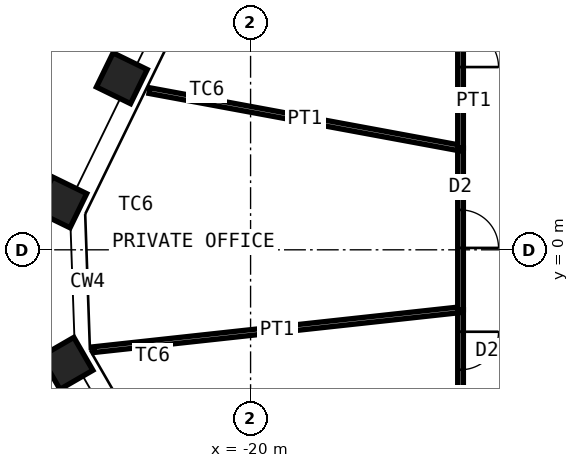
"""IFC4 building model, lengths in metres.
Left out: names, types, materials, properties, quantities, classifications, styles, units other than length and angle.
Written with IfcOpenShell. Run it as: python <this file> out.ifc"""

import sys

from ifc_helpers import new_model, si_unit, direction, frame, frame_2d, origin, origin_2d, place, context, subcontext, project, spatial, rectangle, hollow_rectangle, extrude, element, fill, save


model = new_model("IFC4")
c1 = context("Model", 3, precision=1e-05, world=origin(), true_north=direction((0.0, 1.0)))
c2 = subcontext(c1, "Body", "Model", "MODEL_VIEW")
j1 = project(units=[si_unit("LENGTHUNIT", "METRE"), si_unit("PLANEANGLEUNIT", "RADIAN")], contexts=[c1])
p1 = place(None, origin())
s1 = spatial("IfcSite", under=j1, at=p1, CompositionType="ELEMENT")
p2 = place(p1, origin())
s2 = spatial("IfcBuilding", under=s1, at=p2, CompositionType="ELEMENT")
p3 = place(p2, frame((0.0, 0.0, 239.2)))
s3 = spatial("IfcBuildingStorey", under=s2, at=p3, CompositionType="ELEMENT", Elevation=239.2)
for number, where, z_axis, x_axis in (
    (1, (-24.833, -2.988, 0.0), (0.0, 0.0, 1.0), (0.5, -0.866, 0.0)),
    (2, (-24.981, 1.248, 0.0), (0.0, 0.0, 1.0), (-0.438, -0.899, 0.0)),
    (3, (-23.388, 4.514, 0.0), (0.0, 0.0, 1.0), (-0.438, -0.899, 0.0)),
):
    element("IfcColumn", number, at=place(p3, frame(where, z_axis=z_axis, x_axis=x_axis)), inside=s3, PredefinedType="COLUMN", context=c2, shape_type="SweptSolid", body=[
        extrude(hollow_rectangle(XDim=1.0, YDim=1.0, WallThickness=0.06, at=origin_2d()), origin(), (0.0, 0.0, 1.0), 4.2),
    ])
p4 = place(p3, frame((-14.475, -3.736, 0.0), z_axis=(0.0, 0.0, 1.0), x_axis=(0.0, 1.0, 0.0)))
e4 = element("IfcWall", 4, at=p4, inside=s3, PredefinedType="PARTITIONING", context=c2, shape_type="SweptSolid", body=[
    extrude(rectangle(XDim=2.16, YDim=0.15, at=frame_2d((1.08, 0.0))), origin(), (0.0, 0.0, 1.0), 4.03),
])
p5 = place(p4, frame((0.58, 0.0, 0.0)))
e5 = element("IfcOpeningElement", 5, at=p5, cuts=e4, PredefinedType="OPENING", context=c2, shape_type="SweptSolid", body=[
    extrude(rectangle(XDim=1.0, YDim=2.4, at=frame_2d((0.5, 1.2))), frame((0.0, 0.085, 0.0), z_axis=(0.0, -1.0, 0.0), x_axis=(1.0, 0.0, 0.0)), (0.0, 0.0, 1.0), 0.17),
])
p6 = place(p3, frame((-24.128, -2.627, 0.0), z_axis=(0.0, 0.0, 1.0), x_axis=(0.994126892449, 0.108220708326, 0.0)))
e6 = element("IfcWall", 6, at=p6, inside=s3, PredefinedType="PARTITIONING", context=c2, shape_type="SweptSolid", body=[
    extrude(rectangle(XDim=9.71, YDim=0.15, at=frame_2d((4.855, 0.0))), origin(), (0.0, 0.0, 1.0), 2.93),
])
p7 = place(p3, frame((-14.475, -1.576, 0.0), z_axis=(0.0, 0.0, 1.0), x_axis=(0.0, 1.0, 0.0)))
e7 = element("IfcWall", 7, at=p7, inside=s3, PredefinedType="PARTITIONING", context=c2, shape_type="SweptSolid", body=[
    extrude(rectangle(XDim=4.252, YDim=0.15, at=frame_2d((2.126, 0.0))), origin(), (0.0, 0.0, 1.0), 4.03),
])
p8 = place(p7, frame((1.626, 0.0, 0.0)))
e8 = element("IfcOpeningElement", 8, at=p8, cuts=e7, PredefinedType="OPENING", context=c2, shape_type="SweptSolid", body=[
    extrude(rectangle(XDim=1.0, YDim=2.4, at=frame_2d((0.5, 1.2))), frame((0.0, 0.085, 0.0), z_axis=(0.0, -1.0, 0.0), x_axis=(1.0, 0.0, 0.0)), (0.0, 0.0, 1.0), 0.17),
])
p9 = place(p3, frame((-22.661, 4.189, 0.0), z_axis=(0.0, 0.0, 1.0), x_axis=(0.983345347199, -0.181746879316, 0.0)))
e9 = element("IfcWall", 9, at=p9, inside=s3, PredefinedType="PARTITIONING", context=c2, shape_type="SweptSolid", body=[
    extrude(rectangle(XDim=8.324, YDim=0.15, at=frame_2d((4.162, 0.0))), origin(), (0.0, 0.0, 1.0), 3.43),
])
p10 = place(p3, frame((-14.475, 2.676, 0.0), z_axis=(0.0, 0.0, 1.0), x_axis=(0.0, 1.0, 0.0)))
e10 = element("IfcWall", 10, at=p10, inside=s3, PredefinedType="PARTITIONING", context=c2, shape_type="SweptSolid", body=[
    extrude(rectangle(XDim=5.266, YDim=0.15, at=frame_2d((2.633, 0.0))), origin(), (0.0, 0.0, 1.0), 4.03),
])
p11 = place(p10, frame((2.133, 0.0, 0.0)))
e11 = element("IfcOpeningElement", 11, at=p11, cuts=e10, PredefinedType="OPENING", context=c2, shape_type="SweptSolid", body=[
    extrude(rectangle(XDim=1.0, YDim=2.4, at=frame_2d((0.5, 1.2))), frame((0.0, 0.085, 0.0), z_axis=(0.0, -1.0, 0.0), x_axis=(1.0, 0.0, 0.0)), (0.0, 0.0, 1.0), 0.17),
])
p12 = place(p5, origin())
e12 = element("IfcDoor", 12, at=p12, inside=s3, OperationType="SINGLE_SWING_RIGHT", PredefinedType="DOOR", context=c2, shape_type="SweptSolid", body=[
    extrude(rectangle(XDim=1.0, YDim=2.4, at=frame_2d((0.5, 1.2))), frame((0.0, 0.025, 0.0), z_axis=(0.0, -1.0, 0.0), x_axis=(1.0, 0.0, 0.0)), (0.0, 0.0, 1.0), 0.05),
])
fill(e5, e12)
p13 = place(p8, origin())
e13 = element("IfcDoor", 13, at=p13, inside=s3, OperationType="SINGLE_SWING_LEFT", PredefinedType="DOOR", context=c2, shape_type="SweptSolid", body=[
    extrude(rectangle(XDim=1.0, YDim=2.4, at=frame_2d((0.5, 1.2))), frame((0.0, 0.025, 0.0), z_axis=(0.0, -1.0, 0.0), x_axis=(1.0, 0.0, 0.0)), (0.0, 0.0, 1.0), 0.05),
])
fill(e8, e13)
p14 = place(p11, origin())
e14 = element("IfcDoor", 14, at=p14, inside=s3, OperationType="SINGLE_SWING_LEFT", PredefinedType="DOOR", context=c2, shape_type="SweptSolid", body=[
    extrude(rectangle(XDim=1.0, YDim=2.4, at=frame_2d((0.5, 1.2))), frame((0.0, 0.025, 0.0), z_axis=(0.0, -1.0, 0.0), x_axis=(1.0, 0.0, 0.0)), (0.0, 0.0, 1.0), 0.05),
])
fill(e11, e14)
save(model, sys.argv[1])
